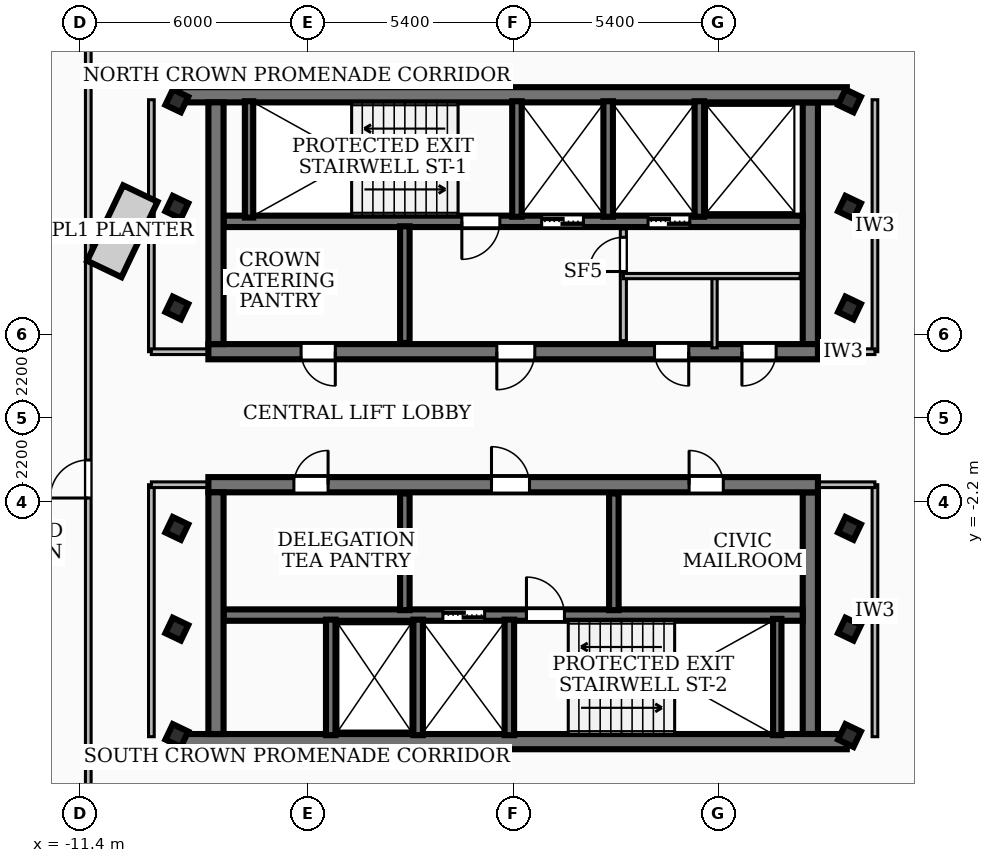
"""IFC4 building model, lengths in metres.
Left out: names, types, materials, properties, quantities, classifications, styles, units other than length and angle.
Written with IfcOpenShell. Run it as: python <this file> out.ifc"""

import sys

from ifc_helpers import new_model, si_unit, direction, frame, frame_2d, origin, origin_2d, place, context, subcontext, project, spatial, rectangle, hollow_rectangle, extrude, element, fill, save


model = new_model("IFC4")
c1 = context("Model", 3, precision=1e-05, world=origin(), true_north=direction((0.0, 1.0)))
c2 = subcontext(c1, "Body", "Model", "MODEL_VIEW")
j1 = project(units=[si_unit("LENGTHUNIT", "METRE"), si_unit("PLANEANGLEUNIT", "RADIAN")], contexts=[c1])
p1 = place(None, origin())
s1 = spatial("IfcSite", under=j1, at=p1, CompositionType="ELEMENT")
p2 = place(p1, origin())
s2 = spatial("IfcBuilding", under=s1, at=p2, CompositionType="ELEMENT")
p3 = place(p2, frame((0.0, 0.0, 293.4)))
s3 = spatial("IfcBuildingStorey", under=s2, at=p3, CompositionType="ELEMENT", Elevation=293.4)
p4 = place(p3, frame((-8.78, 8.51, 0.0), z_axis=(0.0, 0.0, 1.0), x_axis=(1.0, 0.0, 0.0)))
e1 = element("IfcWall", 1, at=p4, inside=s3, PredefinedType="SHEAR", context=c2, shape_type="SweptSolid", body=[
    extrude(rectangle(XDim=17.56, YDim=0.4, at=frame_2d((8.78, 0.0))), origin(), (0.0, 0.0, 1.0), 3.84),
])
p5 = place(p3, frame((8.02, 1.75, 0.0), z_axis=(0.0, 0.0, 1.0), x_axis=(-1.0, 0.0, 0.0)))
e2 = element("IfcWall", 2, at=p5, inside=s3, PredefinedType="SHEAR", context=c2, shape_type="SweptSolid", body=[
    extrude(rectangle(XDim=16.04, YDim=0.4, at=frame_2d((8.02, 0.0))), origin(), (0.0, 0.0, 1.0), 3.84),
])
p6 = place(p5, frame((7.45, 0.0, 0.0)))
e3 = element("IfcOpeningElement", 3, at=p6, cuts=e2, PredefinedType="OPENING", context=c2, shape_type="SweptSolid", body=[
    extrude(rectangle(XDim=1.0, YDim=2.1, at=frame_2d((0.5, 1.05))), frame((0.0, 0.21, 0.0), z_axis=(0.0, -1.0, 0.0), x_axis=(1.0, 0.0, 0.0)), (0.0, 0.0, 1.0), 0.42),
])
p7 = place(p5, frame((12.7, 0.0, 0.0)))
e4 = element("IfcOpeningElement", 4, at=p7, cuts=e2, PredefinedType="OPENING", context=c2, shape_type="SweptSolid", body=[
    extrude(rectangle(XDim=0.9, YDim=2.06, at=frame_2d((0.45, 1.03))), frame((0.0, 0.21, 0.0), z_axis=(0.0, -1.0, 0.0), x_axis=(1.0, 0.0, 0.0)), (0.0, 0.0, 1.0), 0.42),
])
p8 = place(p5, frame((3.4, 0.0, 0.0)))
e5 = element("IfcOpeningElement", 5, at=p8, cuts=e2, PredefinedType="OPENING", context=c2, shape_type="SweptSolid", body=[
    extrude(rectangle(XDim=0.9, YDim=2.06, at=frame_2d((0.45, 1.03))), frame((0.0, 0.21, 0.0), z_axis=(0.0, -1.0, 0.0), x_axis=(1.0, 0.0, 0.0)), (0.0, 0.0, 1.0), 0.42),
])
p9 = place(p5, frame((1.1, 0.0, 0.0)))
e6 = element("IfcOpeningElement", 6, at=p9, cuts=e2, PredefinedType="OPENING", context=c2, shape_type="SweptSolid", body=[
    extrude(rectangle(XDim=0.9, YDim=2.06, at=frame_2d((0.45, 1.03))), frame((0.0, 0.21, 0.0), z_axis=(0.0, -1.0, 0.0), x_axis=(1.0, 0.0, 0.0)), (0.0, 0.0, 1.0), 0.42),
])
for number, where, z_axis, x_axis in (
    (7, (-7.82, 1.95, 0.0), (0.0, 0.0, 1.0), (0.0, 1.0, 0.0)),
    (8, (7.82, 8.31, 0.0), (0.0, 0.0, 1.0), (0.0, -1.0, 0.0)),
):
    element("IfcWall", number, at=place(p3, frame(where, z_axis=z_axis, x_axis=x_axis)), inside=s3, PredefinedType="SHEAR", context=c2, shape_type="SweptSolid", body=[
        extrude(rectangle(XDim=6.36, YDim=0.4, at=frame_2d((3.18, 0.0))), origin(), (0.0, 0.0, 1.0), 3.84),
    ])
p10 = place(p3, frame((7.62, 5.18, 0.0), z_axis=(0.0, 0.0, 1.0), x_axis=(-1.0, 0.0, 0.0)))
e9 = element("IfcWall", 9, at=p10, inside=s3, PredefinedType="SOLIDWALL", context=c2, shape_type="SweptSolid", body=[
    extrude(rectangle(XDim=15.24, YDim=0.3, at=frame_2d((7.62, 0.0))), origin(), (0.0, 0.0, 1.0), 3.84),
])
p11 = place(p10, frame((5.77, 0.0, 0.0)))
e10 = element("IfcOpeningElement", 10, at=p11, cuts=e9, PredefinedType="OPENING", context=c2, shape_type="SweptSolid", body=[
    extrude(rectangle(XDim=1.1, YDim=2.15, at=frame_2d((0.55, 1.075))), frame((0.0, 0.16, 0.0), z_axis=(0.0, -1.0, 0.0), x_axis=(1.0, 0.0, 0.0)), (0.0, 0.0, 1.0), 0.32),
])
p12 = place(p10, frame((2.97, 0.0, 0.0)))
e11 = element("IfcOpeningElement", 11, at=p12, cuts=e9, PredefinedType="OPENING", context=c2, shape_type="SweptSolid", body=[
    extrude(rectangle(XDim=1.1, YDim=2.15, at=frame_2d((0.55, 1.075))), frame((0.0, 0.16, 0.0), z_axis=(0.0, -1.0, 0.0), x_axis=(1.0, 0.0, 0.0)), (0.0, 0.0, 1.0), 0.32),
])
p13 = place(p10, frame((7.97, 0.0, 0.0)))
e12 = element("IfcOpeningElement", 12, at=p13, cuts=e9, PredefinedType="OPENING", context=c2, shape_type="SweptSolid", body=[
    extrude(rectangle(XDim=1.0, YDim=2.1, at=frame_2d((0.5, 1.05))), frame((0.0, 0.16, 0.0), z_axis=(0.0, -1.0, 0.0), x_axis=(1.0, 0.0, 0.0)), (0.0, 0.0, 1.0), 0.32),
])
p14 = place(p3, frame((8.78, -8.51, 0.0), z_axis=(0.0, 0.0, 1.0), x_axis=(-1.0, 0.0, 0.0)))
e13 = element("IfcWall", 13, at=p14, inside=s3, PredefinedType="SHEAR", context=c2, shape_type="SweptSolid", body=[
    extrude(rectangle(XDim=17.56, YDim=0.4, at=frame_2d((8.78, 0.0))), origin(), (0.0, 0.0, 1.0), 3.84),
])
p15 = place(p3, frame((-8.02, -1.75, 0.0), z_axis=(0.0, 0.0, 1.0), x_axis=(1.0, 0.0, 0.0)))
e14 = element("IfcWall", 14, at=p15, inside=s3, PredefinedType="SHEAR", context=c2, shape_type="SweptSolid", body=[
    extrude(rectangle(XDim=16.04, YDim=0.4, at=frame_2d((8.02, 0.0))), origin(), (0.0, 0.0, 1.0), 3.84),
])
p16 = place(p15, frame((7.45, 0.0, 0.0)))
e15 = element("IfcOpeningElement", 15, at=p16, cuts=e14, PredefinedType="OPENING", context=c2, shape_type="SweptSolid", body=[
    extrude(rectangle(XDim=1.0, YDim=2.1, at=frame_2d((0.5, 1.05))), frame((0.0, 0.21, 0.0), z_axis=(0.0, -1.0, 0.0), x_axis=(1.0, 0.0, 0.0)), (0.0, 0.0, 1.0), 0.42),
])
p17 = place(p15, frame((12.65, 0.0, 0.0)))
e16 = element("IfcOpeningElement", 16, at=p17, cuts=e14, PredefinedType="OPENING", context=c2, shape_type="SweptSolid", body=[
    extrude(rectangle(XDim=0.9, YDim=2.06, at=frame_2d((0.45, 1.03))), frame((0.0, 0.21, 0.0), z_axis=(0.0, -1.0, 0.0), x_axis=(1.0, 0.0, 0.0)), (0.0, 0.0, 1.0), 0.42),
])
p18 = place(p15, frame((2.25, 0.0, 0.0)))
e17 = element("IfcOpeningElement", 17, at=p18, cuts=e14, PredefinedType="OPENING", context=c2, shape_type="SweptSolid", body=[
    extrude(rectangle(XDim=0.9, YDim=2.06, at=frame_2d((0.45, 1.03))), frame((0.0, 0.21, 0.0), z_axis=(0.0, -1.0, 0.0), x_axis=(1.0, 0.0, 0.0)), (0.0, 0.0, 1.0), 0.42),
])
for number, where, z_axis, x_axis in (
    (18, (-7.82, -8.31, 0.0), (0.0, 0.0, 1.0), (0.0, 1.0, 0.0)),
    (19, (7.82, -1.95, 0.0), (0.0, 0.0, 1.0), (0.0, -1.0, 0.0)),
):
    element("IfcWall", number, at=place(p3, frame(where, z_axis=z_axis, x_axis=x_axis)), inside=s3, PredefinedType="SHEAR", context=c2, shape_type="SweptSolid", body=[
        extrude(rectangle(XDim=6.36, YDim=0.4, at=frame_2d((3.18, 0.0))), origin(), (0.0, 0.0, 1.0), 3.84),
    ])
p19 = place(p3, frame((-7.62, -5.18, 0.0), z_axis=(0.0, 0.0, 1.0), x_axis=(1.0, 0.0, 0.0)))
e20 = element("IfcWall", 20, at=p19, inside=s3, PredefinedType="SOLIDWALL", context=c2, shape_type="SweptSolid", body=[
    extrude(rectangle(XDim=15.24, YDim=0.3, at=frame_2d((7.62, 0.0))), origin(), (0.0, 0.0, 1.0), 3.84),
])
p20 = place(p19, frame((5.77, 0.0, 0.0)))
e21 = element("IfcOpeningElement", 21, at=p20, cuts=e20, PredefinedType="OPENING", context=c2, shape_type="SweptSolid", body=[
    extrude(rectangle(XDim=1.1, YDim=2.15, at=frame_2d((0.55, 1.075))), frame((0.0, 0.16, 0.0), z_axis=(0.0, -1.0, 0.0), x_axis=(1.0, 0.0, 0.0)), (0.0, 0.0, 1.0), 0.32),
])
p21 = place(p19, frame((7.97, 0.0, 0.0)))
e22 = element("IfcOpeningElement", 22, at=p21, cuts=e20, PredefinedType="OPENING", context=c2, shape_type="SweptSolid", body=[
    extrude(rectangle(XDim=1.0, YDim=2.1, at=frame_2d((0.5, 1.05))), frame((0.0, 0.16, 0.0), z_axis=(0.0, -1.0, 0.0), x_axis=(1.0, 0.0, 0.0)), (0.0, 0.0, 1.0), 0.32),
])
for number, where, z_axis, x_axis in (
    (23, (-6.95, 5.28, 0.0), (0.0, 0.0, 1.0), (0.0, 1.0, 0.0)),
    (24, (6.95, -8.34, 0.0), (0.0, 0.0, 1.0), (0.0, 1.0, 0.0)),
):
    element("IfcWall", number, at=place(p3, frame(where, z_axis=z_axis, x_axis=x_axis)), inside=s3, PredefinedType="SOLIDWALL", context=c2, shape_type="SweptSolid", body=[
        extrude(rectangle(XDim=3.06, YDim=0.22, at=frame_2d((1.53, 0.0))), origin(), (0.0, 0.0, 1.0), 3.84),
    ])
for number, where, z_axis, x_axis in (
    (25, (0.1, 5.3, 0.0), (0.0, 0.0, 1.0), (0.0, 1.0, 0.0)),
    (26, (2.5, 5.3, 0.0), (0.0, 0.0, 1.0), (0.0, 1.0, 0.0)),
    (27, (4.9, 5.3, 0.0), (0.0, 0.0, 1.0), (0.0, 1.0, 0.0)),
):
    element("IfcWall", number, at=place(p3, frame(where, z_axis=z_axis, x_axis=x_axis)), inside=s3, PredefinedType="SOLIDWALL", context=c2, shape_type="SweptSolid", body=[
        extrude(rectangle(XDim=3.04, YDim=0.25, at=frame_2d((1.52, 0.0))), origin(), (0.0, 0.0, 1.0), 3.84),
    ])
p22 = place(p3, frame((-2.85, 1.98, 0.0), z_axis=(0.0, 0.0, 1.0), x_axis=(0.0, 1.0, 0.0)))
e28 = element("IfcWall", 28, at=p22, inside=s3, PredefinedType="SOLIDWALL", context=c2, shape_type="SweptSolid", body=[
    extrude(rectangle(XDim=3.07, YDim=0.25, at=frame_2d((1.535, 0.0))), origin(), (0.0, 0.0, 1.0), 3.84),
])
for number, where, z_axis, x_axis in (
    (29, (-0.1, -8.34, 0.0), (0.0, 0.0, 1.0), (0.0, 1.0, 0.0)),
    (30, (-2.5, -8.34, 0.0), (0.0, 0.0, 1.0), (0.0, 1.0, 0.0)),
    (31, (-4.8, -8.34, 0.0), (0.0, 0.0, 1.0), (0.0, 1.0, 0.0)),
):
    element("IfcWall", number, at=place(p3, frame(where, z_axis=z_axis, x_axis=x_axis)), inside=s3, PredefinedType="SOLIDWALL", context=c2, shape_type="SweptSolid", body=[
        extrude(rectangle(XDim=3.04, YDim=0.25, at=frame_2d((1.52, 0.0))), origin(), (0.0, 0.0, 1.0), 3.84),
    ])
for number, where, z_axis, x_axis in (
    (32, (-2.85, -5.05, 0.0), (0.0, 0.0, 1.0), (0.0, 1.0, 0.0)),
    (33, (2.65, -5.05, 0.0), (0.0, 0.0, 1.0), (0.0, 1.0, 0.0)),
):
    element("IfcWall", number, at=place(p3, frame(where, z_axis=z_axis, x_axis=x_axis)), inside=s3, PredefinedType="SOLIDWALL", context=c2, shape_type="SweptSolid", body=[
        extrude(rectangle(XDim=3.07, YDim=0.25, at=frame_2d((1.535, 0.0))), origin(), (0.0, 0.0, 1.0), 3.84),
    ])
for number, where, z_axis, x_axis in (
    (34, (-8.85, -5.55, 0.0), (0.0, 0.0, 1.0), (0.431, 0.902, 0.0)),
    (35, (-8.85, -2.9, 0.0), (0.0, 0.0, 1.0), (0.431, 0.902, 0.0)),
    (36, (-8.85, 2.9, 0.0), (0.0, 0.0, 1.0), (0.431, 0.902, 0.0)),
    (37, (-8.85, 5.55, 0.0), (0.0, 0.0, 1.0), (0.431, 0.902, 0.0)),
    (38, (8.85, -5.55, 0.0), (0.0, 0.0, 1.0), (0.431, 0.902, 0.0)),
    (39, (8.85, -2.9, 0.0), (0.0, 0.0, 1.0), (0.431, 0.902, 0.0)),
    (40, (8.85, 2.9, 0.0), (0.0, 0.0, 1.0), (0.431, 0.902, 0.0)),
    (41, (8.85, 5.55, 0.0), (0.0, 0.0, 1.0), (0.431, 0.902, 0.0)),
    (42, (-8.85, 8.35, 0.0), (0.0, 0.0, 1.0), (0.431, 0.902, 0.0)),
    (43, (8.85, -8.35, 0.0), (0.0, 0.0, 1.0), (0.431, 0.902, 0.0)),
    (44, (8.85, 8.35, 0.0), (0.0, 0.0, 1.0), (0.431, 0.902, 0.0)),
    (45, (-8.85, -8.35, 0.0), (0.0, 0.0, 1.0), (0.431, 0.902, 0.0)),
):
    element("IfcColumn", number, at=place(p3, frame(where, z_axis=z_axis, x_axis=x_axis)), inside=s3, PredefinedType="COLUMN", context=c2, shape_type="SweptSolid", body=[
        extrude(hollow_rectangle(XDim=0.45, YDim=0.45, WallThickness=0.022, at=origin_2d()), origin(), (0.0, 0.0, 1.0), 4.14),
    ])
p23 = place(p3, frame((2.9, 2.04, 0.0), z_axis=(0.0, 0.0, 1.0), x_axis=(0.0, 1.0, 0.0)))
e46 = element("IfcWall", 46, at=p23, inside=s3, PredefinedType="PARTITIONING", context=c2, shape_type="SweptSolid", body=[
    extrude(rectangle(XDim=2.94, YDim=0.16, at=frame_2d((1.47, 0.0))), origin(), (0.0, 0.0, 1.0), 3.07),
])
p24 = place(p23, frame((1.82, 0.0, 0.0)))
e47 = element("IfcOpeningElement", 47, at=p24, cuts=e46, PredefinedType="OPENING", context=c2, shape_type="SweptSolid", body=[
    extrude(rectangle(XDim=0.9, YDim=2.06, at=frame_2d((0.45, 1.03))), frame((0.0, 0.09, 0.0), z_axis=(0.0, -1.0, 0.0), x_axis=(1.0, 0.0, 0.0)), (0.0, 0.0, 1.0), 0.18),
])
p25 = place(p3, frame((2.9, 3.74, 0.0), z_axis=(0.0, 0.0, 1.0), x_axis=(1.0, 0.0, 0.0)))
e48 = element("IfcWall", 48, at=p25, inside=s3, PredefinedType="PARTITIONING", context=c2, shape_type="SweptSolid", body=[
    extrude(rectangle(XDim=4.65, YDim=0.138, at=frame_2d((2.325, 0.0))), origin(), (0.0, 0.0, 1.0), 3.84),
])
p26 = place(p3, frame((5.3, 1.85, 0.0), z_axis=(0.0, 0.0, 1.0), x_axis=(0.0, 1.0, 0.0)))
e49 = element("IfcWall", 49, at=p26, inside=s3, PredefinedType="PARTITIONING", context=c2, shape_type="SweptSolid", body=[
    extrude(rectangle(XDim=1.89, YDim=0.138, at=frame_2d((0.945, 0.0))), origin(), (0.0, 0.0, 1.0), 3.07),
])
p27 = place(p3, frame((-9.52, 1.75, 0.0), z_axis=(0.0, 0.0, 1.0), x_axis=(0.0, 1.0, 0.0)))
e50 = element("IfcWall", 50, at=p27, inside=s3, PredefinedType="PARTITIONING", context=c2, shape_type="SweptSolid", body=[
    extrude(rectangle(XDim=6.63, YDim=0.15, at=frame_2d((3.315, 0.0))), origin(), (0.0, 0.0, 1.0), 3.21),
])
p28 = place(p3, frame((-7.85, 1.75, 0.0), z_axis=(0.0, 0.0, 1.0), x_axis=(-1.0, 0.0, 0.0)))
e51 = element("IfcWall", 51, at=p28, inside=s3, PredefinedType="PARTITIONING", context=c2, shape_type="SweptSolid", body=[
    extrude(rectangle(XDim=1.67, YDim=0.15, at=frame_2d((0.835, 0.0))), origin(), (0.0, 0.0, 1.0), 3.07),
])
p29 = place(p3, frame((-9.52, -8.38, 0.0), z_axis=(0.0, 0.0, 1.0), x_axis=(0.0, 1.0, 0.0)))
e52 = element("IfcWall", 52, at=p29, inside=s3, PredefinedType="PARTITIONING", context=c2, shape_type="SweptSolid", body=[
    extrude(rectangle(XDim=6.63, YDim=0.15, at=frame_2d((3.315, 0.0))), origin(), (0.0, 0.0, 1.0), 3.84),
])
p30 = place(p3, frame((-7.85, -1.75, 0.0), z_axis=(0.0, 0.0, 1.0), x_axis=(-1.0, 0.0, 0.0)))
e53 = element("IfcWall", 53, at=p30, inside=s3, PredefinedType="PARTITIONING", context=c2, shape_type="SweptSolid", body=[
    extrude(rectangle(XDim=1.67, YDim=0.15, at=frame_2d((0.835, 0.0))), origin(), (0.0, 0.0, 1.0), 3.07),
])
p31 = place(p3, frame((9.52, 1.75, 0.0), z_axis=(0.0, 0.0, 1.0), x_axis=(0.0, 1.0, 0.0)))
e54 = element("IfcWall", 54, at=p31, inside=s3, PredefinedType="PARTITIONING", context=c2, shape_type="SweptSolid", body=[
    extrude(rectangle(XDim=6.63, YDim=0.15, at=frame_2d((3.315, 0.0))), origin(), (0.0, 0.0, 1.0), 3.84),
])
p32 = place(p3, frame((7.85, 1.75, 0.0), z_axis=(0.0, 0.0, 1.0), x_axis=(1.0, 0.0, 0.0)))
e55 = element("IfcWall", 55, at=p32, inside=s3, PredefinedType="PARTITIONING", context=c2, shape_type="SweptSolid", body=[
    extrude(rectangle(XDim=1.67, YDim=0.15, at=frame_2d((0.835, 0.0))), origin(), (0.0, 0.0, 1.0), 3.07),
])
p33 = place(p3, frame((9.52, -8.38, 0.0), z_axis=(0.0, 0.0, 1.0), x_axis=(0.0, 1.0, 0.0)))
e56 = element("IfcWall", 56, at=p33, inside=s3, PredefinedType="PARTITIONING", context=c2, shape_type="SweptSolid", body=[
    extrude(rectangle(XDim=6.63, YDim=0.15, at=frame_2d((3.315, 0.0))), origin(), (0.0, 0.0, 1.0), 3.21),
])
p34 = place(p3, frame((7.85, -1.75, 0.0), z_axis=(0.0, 0.0, 1.0), x_axis=(1.0, 0.0, 0.0)))
e57 = element("IfcWall", 57, at=p34, inside=s3, PredefinedType="PARTITIONING", context=c2, shape_type="SweptSolid", body=[
    extrude(rectangle(XDim=1.67, YDim=0.15, at=frame_2d((0.835, 0.0))), origin(), (0.0, 0.0, 1.0), 3.07),
])
p35 = place(p3, frame((-11.18, -10.599, 0.0), z_axis=(0.0, 0.0, 1.0), x_axis=(0.0, 1.0, 0.0)))
e58 = element("IfcWall", 58, at=p35, inside=s3, PredefinedType="PARTITIONING", context=c2, shape_type="SweptSolid", body=[
    extrude(rectangle(XDim=21.322, YDim=0.15, at=frame_2d((10.661, 0.0))), origin(), (0.0, 0.0, 1.0), 3.84),
])
p36 = place(p35, frame((8.499, 0.0, 0.0)))
e59 = element("IfcOpeningElement", 59, at=p36, cuts=e58, PredefinedType="OPENING", context=c2, shape_type="SweptSolid", body=[
    extrude(rectangle(XDim=1.0, YDim=2.1, at=frame_2d((0.5, 1.05))), frame((0.0, 0.085, 0.0), z_axis=(0.0, -1.0, 0.0), x_axis=(1.0, 0.0, 0.0)), (0.0, 0.0, 1.0), 0.17),
])
p37 = place(p6, origin())
e60 = element("IfcDoor", 60, at=p37, inside=s3, OperationType="SINGLE_SWING_RIGHT", PredefinedType="DOOR", context=c2, shape_type="SweptSolid", body=[
    extrude(rectangle(XDim=1.0, YDim=2.1, at=frame_2d((0.5, 1.05))), frame((0.0, 0.025, 0.0), z_axis=(0.0, -1.0, 0.0), x_axis=(1.0, 0.0, 0.0)), (0.0, 0.0, 1.0), 0.05),
])
fill(e3, e60)
p38 = place(p16, origin())
e61 = element("IfcDoor", 61, at=p38, inside=s3, OperationType="SINGLE_SWING_LEFT", PredefinedType="DOOR", context=c2, shape_type="SweptSolid", body=[
    extrude(rectangle(XDim=1.0, YDim=2.1, at=frame_2d((0.5, 1.05))), frame((0.0, 0.025, 0.0), z_axis=(0.0, -1.0, 0.0), x_axis=(1.0, 0.0, 0.0)), (0.0, 0.0, 1.0), 0.05),
])
fill(e15, e61)
p39 = place(p11, origin())
e62 = element("IfcDoor", 62, at=p39, inside=s3, OperationType="DOUBLE_DOOR_SLIDING", PredefinedType="DOOR", context=c2, shape_type="SweptSolid", body=[
    extrude(rectangle(XDim=1.1, YDim=2.15, at=frame_2d((0.55, 1.075))), frame((0.0, 0.025, 0.0), z_axis=(0.0, -1.0, 0.0), x_axis=(1.0, 0.0, 0.0)), (0.0, 0.0, 1.0), 0.05),
])
fill(e10, e62)
p40 = place(p12, origin())
e63 = element("IfcDoor", 63, at=p40, inside=s3, OperationType="DOUBLE_DOOR_SLIDING", PredefinedType="DOOR", context=c2, shape_type="SweptSolid", body=[
    extrude(rectangle(XDim=1.1, YDim=2.15, at=frame_2d((0.55, 1.075))), frame((0.0, 0.025, 0.0), z_axis=(0.0, -1.0, 0.0), x_axis=(1.0, 0.0, 0.0)), (0.0, 0.0, 1.0), 0.05),
])
fill(e11, e63)
p41 = place(p13, origin())
e64 = element("IfcDoor", 64, at=p41, inside=s3, OperationType="SINGLE_SWING_RIGHT", PredefinedType="DOOR", context=c2, shape_type="SweptSolid", body=[
    extrude(rectangle(XDim=1.0, YDim=2.1, at=frame_2d((0.5, 1.05))), frame((0.0, 0.025, 0.0), z_axis=(0.0, -1.0, 0.0), x_axis=(1.0, 0.0, 0.0)), (0.0, 0.0, 1.0), 0.05),
])
fill(e12, e64)
p42 = place(p20, origin())
e65 = element("IfcDoor", 65, at=p42, inside=s3, OperationType="DOUBLE_DOOR_SLIDING", PredefinedType="DOOR", context=c2, shape_type="SweptSolid", body=[
    extrude(rectangle(XDim=1.1, YDim=2.15, at=frame_2d((0.55, 1.075))), frame((0.0, 0.025, 0.0), z_axis=(0.0, -1.0, 0.0), x_axis=(1.0, 0.0, 0.0)), (0.0, 0.0, 1.0), 0.05),
])
fill(e21, e65)
p43 = place(p21, origin())
e66 = element("IfcDoor", 66, at=p43, inside=s3, OperationType="SINGLE_SWING_LEFT", PredefinedType="DOOR", context=c2, shape_type="SweptSolid", body=[
    extrude(rectangle(XDim=1.0, YDim=2.1, at=frame_2d((0.5, 1.05))), frame((0.0, 0.025, 0.0), z_axis=(0.0, -1.0, 0.0), x_axis=(1.0, 0.0, 0.0)), (0.0, 0.0, 1.0), 0.05),
])
fill(e22, e66)
p44 = place(p7, origin())
e67 = element("IfcDoor", 67, at=p44, inside=s3, OperationType="SINGLE_SWING_LEFT", PredefinedType="DOOR", context=c2, shape_type="SweptSolid", body=[
    extrude(rectangle(XDim=0.9, YDim=2.06, at=frame_2d((0.45, 1.03))), frame((0.0, 0.025, 0.0), z_axis=(0.0, -1.0, 0.0), x_axis=(1.0, 0.0, 0.0)), (0.0, 0.0, 1.0), 0.05),
])
fill(e4, e67)
p45 = place(p17, origin())
e68 = element("IfcDoor", 68, at=p45, inside=s3, OperationType="SINGLE_SWING_LEFT", PredefinedType="DOOR", context=c2, shape_type="SweptSolid", body=[
    extrude(rectangle(XDim=0.9, YDim=2.06, at=frame_2d((0.45, 1.03))), frame((0.0, 0.025, 0.0), z_axis=(0.0, -1.0, 0.0), x_axis=(1.0, 0.0, 0.0)), (0.0, 0.0, 1.0), 0.05),
])
fill(e16, e68)
p46 = place(p18, origin())
e69 = element("IfcDoor", 69, at=p46, inside=s3, OperationType="SINGLE_SWING_RIGHT", PredefinedType="DOOR", context=c2, shape_type="SweptSolid", body=[
    extrude(rectangle(XDim=0.9, YDim=2.06, at=frame_2d((0.45, 1.03))), frame((0.0, 0.025, 0.0), z_axis=(0.0, -1.0, 0.0), x_axis=(1.0, 0.0, 0.0)), (0.0, 0.0, 1.0), 0.05),
])
fill(e17, e69)
p47 = place(p8, origin())
e70 = element("IfcDoor", 70, at=p47, inside=s3, OperationType="SINGLE_SWING_LEFT", PredefinedType="DOOR", context=c2, shape_type="SweptSolid", body=[
    extrude(rectangle(XDim=0.9, YDim=2.06, at=frame_2d((0.45, 1.03))), frame((0.0, 0.025, 0.0), z_axis=(0.0, -1.0, 0.0), x_axis=(1.0, 0.0, 0.0)), (0.0, 0.0, 1.0), 0.05),
])
fill(e5, e70)
p48 = place(p9, origin())
e71 = element("IfcDoor", 71, at=p48, inside=s3, OperationType="SINGLE_SWING_RIGHT", PredefinedType="DOOR", context=c2, shape_type="SweptSolid", body=[
    extrude(rectangle(XDim=0.9, YDim=2.06, at=frame_2d((0.45, 1.03))), frame((0.0, 0.025, 0.0), z_axis=(0.0, -1.0, 0.0), x_axis=(1.0, 0.0, 0.0)), (0.0, 0.0, 1.0), 0.05),
])
fill(e6, e71)
p49 = place(p24, origin())
e72 = element("IfcDoor", 72, at=p49, inside=s3, OperationType="SINGLE_SWING_LEFT", PredefinedType="DOOR", context=c2, shape_type="SweptSolid", body=[
    extrude(rectangle(XDim=0.9, YDim=2.06, at=frame_2d((0.45, 1.03))), frame((0.0, 0.025, 0.0), z_axis=(0.0, -1.0, 0.0), x_axis=(1.0, 0.0, 0.0)), (0.0, 0.0, 1.0), 0.05),
])
fill(e47, e72)
p50 = place(p36, origin())
e73 = element("IfcDoor", 73, at=p50, inside=s3, OperationType="SINGLE_SWING_LEFT", PredefinedType="DOOR", context=c2, shape_type="SweptSolid", body=[
    extrude(rectangle(XDim=1.0, YDim=2.1, at=frame_2d((0.5, 1.05))), frame((0.0, 0.025, 0.0), z_axis=(0.0, -1.0, 0.0), x_axis=(1.0, 0.0, 0.0)), (0.0, 0.0, 1.0), 0.05),
])
fill(e59, e73)
save(model, sys.argv[1])
